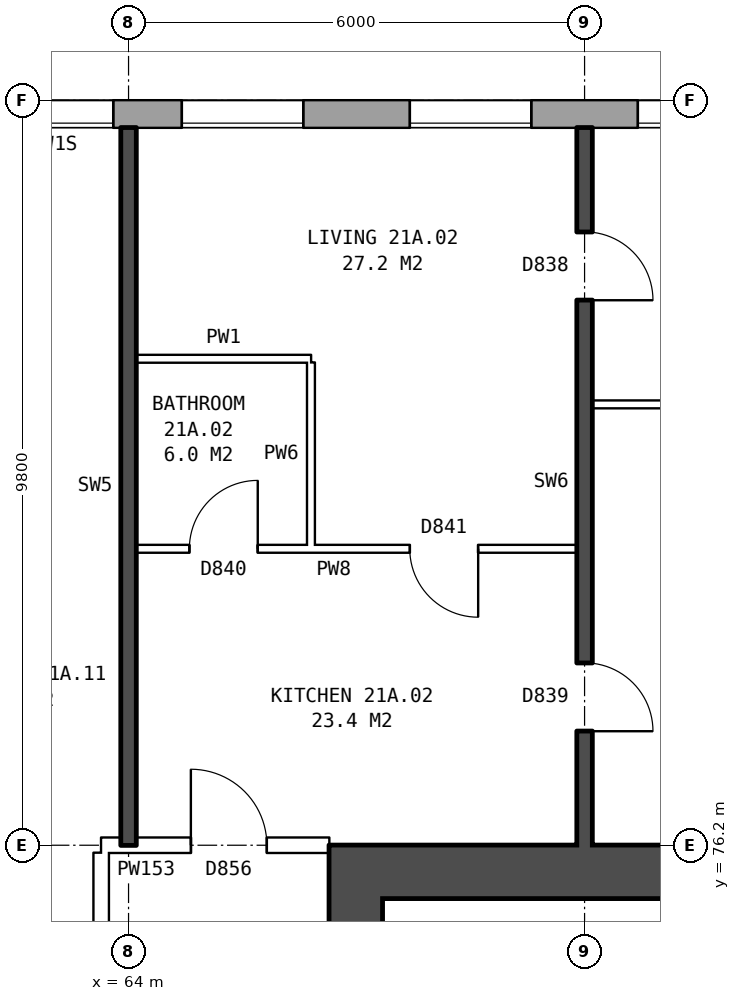
"""IFC4 building model, lengths in metres.
Left out: names, types, materials, properties, quantities, classifications, styles, units other than length and angle.
Written with IfcOpenShell. Run it as: python <this file> out.ifc"""

import sys

from ifc_helpers import new_model, si_unit, direction, frame, frame_2d, origin, place, context, subcontext, project, spatial, rectangle, extrude, element, fill, save


model = new_model("IFC4")
c1 = context("Model", 3, precision=1e-05, world=origin(), true_north=direction((0.0, 1.0)))
c2 = subcontext(c1, "Body", "Model", "MODEL_VIEW")
j1 = project(units=[si_unit("LENGTHUNIT", "METRE"), si_unit("PLANEANGLEUNIT", "RADIAN")], contexts=[c1])
p1 = place(None, origin())
s1 = spatial("IfcSite", under=j1, at=p1, CompositionType="ELEMENT")
p2 = place(p1, origin())
s2 = spatial("IfcBuilding", under=s1, at=p2, CompositionType="ELEMENT")
p3 = place(p2, frame((0.0, 0.0, 77.8)))
s3 = spatial("IfcBuildingStorey", under=s2, at=p3, CompositionType="ELEMENT", Elevation=77.8)
p4 = place(p3, frame((72.925, 85.82, 0.0), z_axis=(0.0, 0.0, 1.0), x_axis=(-1.0, 0.0, 0.0)))
e1 = element("IfcWall", 1, at=p4, inside=s3, PredefinedType="STANDARD", context=c2, shape_type="SweptSolid", body=[
    extrude(rectangle(XDim=46.601, YDim=0.36, at=frame_2d((23.3, 0.0))), origin(), (0.0, 0.0, 1.0), 2.85),
])
p5 = place(p4, frame((0.625, 0.0, 0.8)))
e2 = element("IfcOpeningElement", 2, at=p5, cuts=e1, PredefinedType="OPENING", context=c2, shape_type="SweptSolid", body=[
    extrude(rectangle(XDim=1.6, YDim=1.8, at=frame_2d((0.8, 0.9))), frame((0.0, 0.19, 0.0), z_axis=(0.0, -1.0, 0.0), x_axis=(1.0, 0.0, 0.0)), (0.0, 0.0, 1.0), 0.38),
])
p6 = place(p4, frame((3.625, 0.0, 0.8)))
e3 = element("IfcOpeningElement", 3, at=p6, cuts=e1, PredefinedType="OPENING", context=c2, shape_type="SweptSolid", body=[
    extrude(rectangle(XDim=1.6, YDim=1.8, at=frame_2d((0.8, 0.9))), frame((0.0, 0.19, 0.0), z_axis=(0.0, -1.0, 0.0), x_axis=(1.0, 0.0, 0.0)), (0.0, 0.0, 1.0), 0.38),
])
p7 = place(p4, frame((6.625, 0.0, 0.8)))
e4 = element("IfcOpeningElement", 4, at=p7, cuts=e1, PredefinedType="OPENING", context=c2, shape_type="SweptSolid", body=[
    extrude(rectangle(XDim=1.6, YDim=1.8, at=frame_2d((0.8, 0.9))), frame((0.0, 0.19, 0.0), z_axis=(0.0, -1.0, 0.0), x_axis=(1.0, 0.0, 0.0)), (0.0, 0.0, 1.0), 0.38),
])
p8 = place(p4, frame((9.125, 0.0, 1.65)))
e5 = element("IfcOpeningElement", 5, at=p8, cuts=e1, PredefinedType="OPENING", context=c2, shape_type="SweptSolid", body=[
    extrude(rectangle(XDim=1.4, YDim=0.9, at=frame_2d((0.7, 0.45))), frame((0.0, 0.19, 0.0), z_axis=(0.0, -1.0, 0.0), x_axis=(1.0, 0.0, 0.0)), (0.0, 0.0, 1.0), 0.38),
])
p9 = place(p4, frame((12.625, 0.0, 0.8)))
e6 = element("IfcOpeningElement", 6, at=p9, cuts=e1, PredefinedType="OPENING", context=c2, shape_type="SweptSolid", body=[
    extrude(rectangle(XDim=1.6, YDim=1.8, at=frame_2d((0.8, 0.9))), frame((0.0, 0.19, 0.0), z_axis=(0.0, -1.0, 0.0), x_axis=(1.0, 0.0, 0.0)), (0.0, 0.0, 1.0), 0.38),
])
p10 = place(p4, frame((15.625, 0.0, 0.8)))
e7 = element("IfcOpeningElement", 7, at=p10, cuts=e1, PredefinedType="OPENING", context=c2, shape_type="SweptSolid", body=[
    extrude(rectangle(XDim=1.6, YDim=1.8, at=frame_2d((0.8, 0.9))), frame((0.0, 0.19, 0.0), z_axis=(0.0, -1.0, 0.0), x_axis=(1.0, 0.0, 0.0)), (0.0, 0.0, 1.0), 0.38),
])
p11 = place(p4, frame((18.625, 0.0, 0.8)))
e8 = element("IfcOpeningElement", 8, at=p11, cuts=e1, PredefinedType="OPENING", context=c2, shape_type="SweptSolid", body=[
    extrude(rectangle(XDim=1.6, YDim=1.8, at=frame_2d((0.8, 0.9))), frame((0.0, 0.19, 0.0), z_axis=(0.0, -1.0, 0.0), x_axis=(1.0, 0.0, 0.0)), (0.0, 0.0, 1.0), 0.38),
])
p12 = place(p4, frame((21.625, 0.0, 0.8)))
e9 = element("IfcOpeningElement", 9, at=p12, cuts=e1, PredefinedType="OPENING", context=c2, shape_type="SweptSolid", body=[
    extrude(rectangle(XDim=1.6, YDim=1.8, at=frame_2d((0.8, 0.9))), frame((0.0, 0.19, 0.0), z_axis=(0.0, -1.0, 0.0), x_axis=(1.0, 0.0, 0.0)), (0.0, 0.0, 1.0), 0.38),
])
p13 = place(p4, frame((24.625, 0.0, 0.8)))
e10 = element("IfcOpeningElement", 10, at=p13, cuts=e1, PredefinedType="OPENING", context=c2, shape_type="SweptSolid", body=[
    extrude(rectangle(XDim=1.6, YDim=1.8, at=frame_2d((0.8, 0.9))), frame((0.0, 0.19, 0.0), z_axis=(0.0, -1.0, 0.0), x_axis=(1.0, 0.0, 0.0)), (0.0, 0.0, 1.0), 0.38),
])
p14 = place(p4, frame((27.625, 0.0, 0.8)))
e11 = element("IfcOpeningElement", 11, at=p14, cuts=e1, PredefinedType="OPENING", context=c2, shape_type="SweptSolid", body=[
    extrude(rectangle(XDim=1.6, YDim=1.8, at=frame_2d((0.8, 0.9))), frame((0.0, 0.19, 0.0), z_axis=(0.0, -1.0, 0.0), x_axis=(1.0, 0.0, 0.0)), (0.0, 0.0, 1.0), 0.38),
])
p15 = place(p4, frame((30.625, 0.0, 0.8)))
e12 = element("IfcOpeningElement", 12, at=p15, cuts=e1, PredefinedType="OPENING", context=c2, shape_type="SweptSolid", body=[
    extrude(rectangle(XDim=1.6, YDim=1.8, at=frame_2d((0.8, 0.9))), frame((0.0, 0.19, 0.0), z_axis=(0.0, -1.0, 0.0), x_axis=(1.0, 0.0, 0.0)), (0.0, 0.0, 1.0), 0.38),
])
p16 = place(p4, frame((33.125, 0.0, 0.75)))
e13 = element("IfcOpeningElement", 13, at=p16, cuts=e1, PredefinedType="OPENING", context=c2, shape_type="SweptSolid", body=[
    extrude(rectangle(XDim=0.6, YDim=1.8, at=frame_2d((0.3, 0.9))), frame((0.0, 0.19, 0.0), z_axis=(0.0, -1.0, 0.0), x_axis=(1.0, 0.0, 0.0)), (0.0, 0.0, 1.0), 0.38),
])
p17 = place(p4, frame((36.125, 0.0, 1.6)))
e14 = element("IfcOpeningElement", 14, at=p17, cuts=e1, PredefinedType="OPENING", context=c2, shape_type="SweptSolid", body=[
    extrude(rectangle(XDim=0.6, YDim=0.9, at=frame_2d((0.3, 0.45))), frame((0.0, 0.19, 0.0), z_axis=(0.0, -1.0, 0.0), x_axis=(1.0, 0.0, 0.0)), (0.0, 0.0, 1.0), 0.38),
])
p18 = place(p4, frame((39.625, 0.0, 0.8)))
e15 = element("IfcOpeningElement", 15, at=p18, cuts=e1, PredefinedType="OPENING", context=c2, shape_type="SweptSolid", body=[
    extrude(rectangle(XDim=1.6, YDim=1.8, at=frame_2d((0.8, 0.9))), frame((0.0, 0.19, 0.0), z_axis=(0.0, -1.0, 0.0), x_axis=(1.0, 0.0, 0.0)), (0.0, 0.0, 1.0), 0.38),
])
p19 = place(p4, frame((42.625, 0.0, 0.8)))
e16 = element("IfcOpeningElement", 16, at=p19, cuts=e1, PredefinedType="OPENING", context=c2, shape_type="SweptSolid", body=[
    extrude(rectangle(XDim=1.6, YDim=1.8, at=frame_2d((0.8, 0.9))), frame((0.0, 0.19, 0.0), z_axis=(0.0, -1.0, 0.0), x_axis=(1.0, 0.0, 0.0)), (0.0, 0.0, 1.0), 0.38),
])
p20 = place(p4, frame((11.125, 0.0, 0.15)))
e17 = element("IfcOpeningElement", 17, at=p20, cuts=e1, PredefinedType="OPENING", context=c2, shape_type="SweptSolid", body=[
    extrude(rectangle(XDim=0.6, YDim=0.9, at=frame_2d((0.3, 0.45))), frame((0.0, 0.19, 0.0), z_axis=(0.0, -1.0, 0.0), x_axis=(1.0, 0.0, 0.0)), (0.0, 0.0, 1.0), 0.38),
])
p21 = place(p4, frame((34.025, 0.0, 0.65)))
e18 = element("IfcOpeningElement", 18, at=p21, cuts=e1, PredefinedType="OPENING", context=c2, shape_type="SweptSolid", body=[
    extrude(rectangle(XDim=0.8, YDim=0.9, at=frame_2d((0.4, 0.45))), frame((0.0, 0.19, 0.0), z_axis=(0.0, -1.0, 0.0), x_axis=(1.0, 0.0, 0.0)), (0.0, 0.0, 1.0), 0.38),
])
p22 = place(p4, frame((37.025, 0.0, 0.8)))
e19 = element("IfcOpeningElement", 19, at=p22, cuts=e1, PredefinedType="OPENING", context=c2, shape_type="SweptSolid", body=[
    extrude(rectangle(XDim=1.6, YDim=1.8, at=frame_2d((0.8, 0.9))), frame((0.0, 0.19, 0.0), z_axis=(0.0, -1.0, 0.0), x_axis=(1.0, 0.0, 0.0)), (0.0, 0.0, 1.0), 0.38),
])
p23 = place(p3, frame((66.99, 64.5, 0.0), z_axis=(0.0, 0.0, 1.0), x_axis=(0.0, 1.0, 0.0)))
e20 = element("IfcWall", 20, at=p23, inside=s3, PredefinedType="SHEAR", context=c2, shape_type="SweptSolid", body=[
    extrude(rectangle(XDim=11.0, YDim=0.7, at=frame_2d((5.5, 0.0))), origin(), (0.0, 0.0, 1.0), 2.85),
])
p24 = place(p23, frame((0.625, 0.0, 0.0)))
e21 = element("IfcOpeningElement", 21, at=p24, cuts=e20, PredefinedType="OPENING", context=c2, shape_type="SweptSolid", body=[
    extrude(rectangle(XDim=1.1, YDim=2.1, at=frame_2d((0.55, 1.05))), frame((0.0, 0.36, 0.0), z_axis=(0.0, -1.0, 0.0), x_axis=(1.0, 0.0, 0.0)), (0.0, 0.0, 1.0), 0.72),
])
p25 = place(p23, frame((9.2, 0.0, 0.0)))
e22 = element("IfcOpeningElement", 22, at=p25, cuts=e20, PredefinedType="OPENING", context=c2, shape_type="SweptSolid", body=[
    extrude(rectangle(XDim=1.1, YDim=2.1, at=frame_2d((0.55, 1.05))), frame((0.0, 0.36, 0.0), z_axis=(0.0, -1.0, 0.0), x_axis=(1.0, 0.0, 0.0)), (0.0, 0.0, 1.0), 0.72),
])
p26 = place(p3, frame((66.64, 75.85, 0.0), z_axis=(0.0, 0.0, 1.0), x_axis=(1.0, 0.0, 0.0)))
e23 = element("IfcWall", 23, at=p26, inside=s3, PredefinedType="SHEAR", context=c2, shape_type="SweptSolid", body=[
    extrude(rectangle(XDim=9.0, YDim=0.7, at=frame_2d((4.5, 0.0))), origin(), (0.0, 0.0, 1.0), 2.85),
])
p27 = place(p3, frame((63.64, 63.9, 0.0), z_axis=(0.0, 0.0, 1.0), x_axis=(0.0, 1.0, 0.0)))
e24 = element("IfcWall", 24, at=p27, inside=s3, PredefinedType="PARTITIONING", context=c2, shape_type="SweptSolid", body=[
    extrude(rectangle(XDim=12.2, YDim=0.2, at=frame_2d((6.1, 0.0))), origin(), (0.0, 0.0, 1.0), 2.85),
])
p28 = place(p27, frame((5.1, 0.0, 0.0)))
e25 = element("IfcOpeningElement", 25, at=p28, cuts=e24, PredefinedType="OPENING", context=c2, shape_type="SweptSolid", body=[
    extrude(rectangle(XDim=2.0, YDim=2.1, at=frame_2d((1.0, 1.05))), frame((0.0, 0.11, 0.0), z_axis=(0.0, -1.0, 0.0), x_axis=(1.0, 0.0, 0.0)), (0.0, 0.0, 1.0), 0.22),
])
p29 = place(p3, frame((63.64, 76.2, 0.0), z_axis=(0.0, 0.0, 1.0), x_axis=(1.0, 0.0, 0.0)))
e26 = element("IfcWall", 26, at=p29, inside=s3, PredefinedType="PARTITIONING", context=c2, shape_type="SweptSolid", body=[
    extrude(rectangle(XDim=3.0, YDim=0.2, at=frame_2d((1.5, 0.0))), origin(), (0.0, 0.0, 1.0), 2.85),
])
p30 = place(p29, frame((1.18, 0.0, 0.0)))
e27 = element("IfcOpeningElement", 27, at=p30, cuts=e26, PredefinedType="OPENING", context=c2, shape_type="SweptSolid", body=[
    extrude(rectangle(XDim=1.0, YDim=2.1, at=frame_2d((0.5, 1.05))), frame((0.0, 0.11, 0.0), z_axis=(0.0, -1.0, 0.0), x_axis=(1.0, 0.0, 0.0)), (0.0, 0.0, 1.0), 0.22),
])
p31 = place(p3, frame((64.1, 80.1, 0.0), z_axis=(0.0, 0.0, 1.0), x_axis=(1.0, 0.0, 0.0)))
e28 = element("IfcWall", 28, at=p31, inside=s3, PredefinedType="PARTITIONING", context=c2, shape_type="SweptSolid", body=[
    extrude(rectangle(XDim=5.8, YDim=0.1, at=frame_2d((2.9, 0.0))), origin(), (0.0, 0.0, 1.0), 2.85),
])
p32 = place(p31, frame((3.6, 0.0, 0.0)))
e29 = element("IfcOpeningElement", 29, at=p32, cuts=e28, PredefinedType="OPENING", context=c2, shape_type="SweptSolid", body=[
    extrude(rectangle(XDim=0.9, YDim=2.1, at=frame_2d((0.45, 1.05))), frame((0.0, 0.06, 0.0), z_axis=(0.0, -1.0, 0.0), x_axis=(1.0, 0.0, 0.0)), (0.0, 0.0, 1.0), 0.12),
])
p33 = place(p31, frame((0.7, 0.0, 0.0)))
e30 = element("IfcOpeningElement", 30, at=p33, cuts=e28, PredefinedType="OPENING", context=c2, shape_type="SweptSolid", body=[
    extrude(rectangle(XDim=0.9, YDim=2.1, at=frame_2d((0.45, 1.05))), frame((0.0, 0.06, 0.0), z_axis=(0.0, -1.0, 0.0), x_axis=(1.0, 0.0, 0.0)), (0.0, 0.0, 1.0), 0.12),
])
p34 = place(p3, frame((70.1, 82.0, 0.0), z_axis=(0.0, 0.0, 1.0), x_axis=(1.0, 0.0, 0.0)))
e31 = element("IfcWall", 31, at=p34, inside=s3, PredefinedType="PARTITIONING", context=c2, shape_type="SweptSolid", body=[
    extrude(rectangle(XDim=5.54, YDim=0.1, at=frame_2d((2.77, 0.0))), origin(), (0.0, 0.0, 1.0), 2.85),
])
p35 = place(p3, frame((64.1, 82.6, 0.0), z_axis=(0.0, 0.0, 1.0), x_axis=(1.0, 0.0, 0.0)))
e32 = element("IfcWall", 32, at=p35, inside=s3, PredefinedType="PARTITIONING", context=c2, shape_type="SweptSolid", body=[
    extrude(rectangle(XDim=2.3, YDim=0.1, at=frame_2d((1.15, 0.0))), origin(), (0.0, 0.0, 1.0), 2.85),
])
p36 = place(p3, frame((64.0, 76.2, 0.0), z_axis=(0.0, 0.0, 1.0), x_axis=(0.0, 1.0, 0.0)))
e33 = element("IfcWall", 33, at=p36, inside=s3, PredefinedType="SOLIDWALL", context=c2, shape_type="SweptSolid", body=[
    extrude(rectangle(XDim=9.44, YDim=0.2, at=frame_2d((4.72, 0.0))), origin(), (0.0, 0.0, 1.0), 2.85),
])
p37 = place(p3, frame((66.4, 80.15, 0.0), z_axis=(0.0, 0.0, 1.0), x_axis=(0.0, 1.0, 0.0)))
e34 = element("IfcWall", 34, at=p37, inside=s3, PredefinedType="PARTITIONING", context=c2, shape_type="SweptSolid", body=[
    extrude(rectangle(XDim=2.4, YDim=0.1, at=frame_2d((1.2, 0.0))), origin(), (0.0, 0.0, 1.0), 2.85),
])
p38 = place(p3, frame((70.0, 76.2, 0.0), z_axis=(0.0, 0.0, 1.0), x_axis=(0.0, 1.0, 0.0)))
e35 = element("IfcWall", 35, at=p38, inside=s3, PredefinedType="SOLIDWALL", context=c2, shape_type="SweptSolid", body=[
    extrude(rectangle(XDim=9.44, YDim=0.2, at=frame_2d((4.72, 0.0))), origin(), (0.0, 0.0, 1.0), 2.85),
])
p39 = place(p38, frame((7.17, 0.0, 0.0)))
e36 = element("IfcOpeningElement", 36, at=p39, cuts=e35, PredefinedType="OPENING", context=c2, shape_type="SweptSolid", body=[
    extrude(rectangle(XDim=0.9, YDim=2.1, at=frame_2d((0.45, 1.05))), frame((0.0, 0.11, 0.0), z_axis=(0.0, -1.0, 0.0), x_axis=(1.0, 0.0, 0.0)), (0.0, 0.0, 1.0), 0.22),
])
p40 = place(p38, frame((1.5, 0.0, 0.0)))
e37 = element("IfcOpeningElement", 37, at=p40, cuts=e35, PredefinedType="OPENING", context=c2, shape_type="SweptSolid", body=[
    extrude(rectangle(XDim=0.9, YDim=2.1, at=frame_2d((0.45, 1.05))), frame((0.0, 0.11, 0.0), z_axis=(0.0, -1.0, 0.0), x_axis=(1.0, 0.0, 0.0)), (0.0, 0.0, 1.0), 0.22),
])
p41 = place(p5, origin())
e38 = element("IfcWindow", 38, at=p41, inside=s3, PartitioningType="SINGLE_PANEL", PredefinedType="WINDOW", context=c2, shape_type="SweptSolid", body=[
    extrude(rectangle(XDim=1.6, YDim=1.8, at=frame_2d((0.8, 0.9))), frame((0.0, 0.15, 0.0), z_axis=(0.0, -1.0, 0.0), x_axis=(1.0, 0.0, 0.0)), (0.0, 0.0, 1.0), 0.06),
])
fill(e2, e38)
p42 = place(p6, origin())
e39 = element("IfcWindow", 39, at=p42, inside=s3, PartitioningType="SINGLE_PANEL", PredefinedType="WINDOW", context=c2, shape_type="SweptSolid", body=[
    extrude(rectangle(XDim=1.6, YDim=1.8, at=frame_2d((0.8, 0.9))), frame((0.0, 0.15, 0.0), z_axis=(0.0, -1.0, 0.0), x_axis=(1.0, 0.0, 0.0)), (0.0, 0.0, 1.0), 0.06),
])
fill(e3, e39)
p43 = place(p7, origin())
e40 = element("IfcWindow", 40, at=p43, inside=s3, PartitioningType="SINGLE_PANEL", PredefinedType="WINDOW", context=c2, shape_type="SweptSolid", body=[
    extrude(rectangle(XDim=1.6, YDim=1.8, at=frame_2d((0.8, 0.9))), frame((0.0, 0.15, 0.0), z_axis=(0.0, -1.0, 0.0), x_axis=(1.0, 0.0, 0.0)), (0.0, 0.0, 1.0), 0.06),
])
fill(e4, e40)
p44 = place(p8, origin())
e41 = element("IfcWindow", 41, at=p44, inside=s3, PartitioningType="SINGLE_PANEL", PredefinedType="WINDOW", context=c2, shape_type="SweptSolid", body=[
    extrude(rectangle(XDim=1.4, YDim=0.9, at=frame_2d((0.7, 0.45))), frame((0.0, 0.15, 0.0), z_axis=(0.0, -1.0, 0.0), x_axis=(1.0, 0.0, 0.0)), (0.0, 0.0, 1.0), 0.06),
])
fill(e5, e41)
p45 = place(p39, frame((0.9, 0.0, 0.0), z_axis=(0.0, 0.0, 1.0), x_axis=(-1.0, 0.0, 0.0)))
e42 = element("IfcDoor", 42, at=p45, inside=s3, OperationType="SINGLE_SWING_RIGHT", PredefinedType="DOOR", context=c2, shape_type="SweptSolid", body=[
    extrude(rectangle(XDim=0.9, YDim=2.1, at=frame_2d((0.45, 1.05))), frame((0.0, 0.025, 0.0), z_axis=(0.0, -1.0, 0.0), x_axis=(1.0, 0.0, 0.0)), (0.0, 0.0, 1.0), 0.05),
])
fill(e36, e42)
p46 = place(p40, frame((0.9, 0.0, 0.0), z_axis=(0.0, 0.0, 1.0), x_axis=(-1.0, 0.0, 0.0)))
e43 = element("IfcDoor", 43, at=p46, inside=s3, OperationType="SINGLE_SWING_RIGHT", PredefinedType="DOOR", context=c2, shape_type="SweptSolid", body=[
    extrude(rectangle(XDim=0.9, YDim=2.1, at=frame_2d((0.45, 1.05))), frame((0.0, 0.025, 0.0), z_axis=(0.0, -1.0, 0.0), x_axis=(1.0, 0.0, 0.0)), (0.0, 0.0, 1.0), 0.05),
])
fill(e37, e43)
p47 = place(p30, origin())
e44 = element("IfcDoor", 44, at=p47, inside=s3, OperationType="SINGLE_SWING_LEFT", PredefinedType="DOOR", context=c2, shape_type="SweptSolid", body=[
    extrude(rectangle(XDim=1.0, YDim=2.1, at=frame_2d((0.5, 1.05))), frame((0.0, 0.025, 0.0), z_axis=(0.0, -1.0, 0.0), x_axis=(1.0, 0.0, 0.0)), (0.0, 0.0, 1.0), 0.05),
])
fill(e27, e44)
p48 = place(p32, frame((0.9, 0.0, 0.0), z_axis=(0.0, 0.0, 1.0), x_axis=(-1.0, 0.0, 0.0)))
e45 = element("IfcDoor", 45, at=p48, inside=s3, OperationType="SINGLE_SWING_LEFT", PredefinedType="DOOR", context=c2, shape_type="SweptSolid", body=[
    extrude(rectangle(XDim=0.9, YDim=2.1, at=frame_2d((0.45, 1.05))), frame((0.0, 0.025, 0.0), z_axis=(0.0, -1.0, 0.0), x_axis=(1.0, 0.0, 0.0)), (0.0, 0.0, 1.0), 0.05),
])
fill(e29, e45)
p49 = place(p33, origin())
e46 = element("IfcDoor", 46, at=p49, inside=s3, OperationType="SINGLE_SWING_RIGHT", PredefinedType="DOOR", context=c2, shape_type="SweptSolid", body=[
    extrude(rectangle(XDim=0.9, YDim=2.1, at=frame_2d((0.45, 1.05))), frame((0.0, 0.025, 0.0), z_axis=(0.0, -1.0, 0.0), x_axis=(1.0, 0.0, 0.0)), (0.0, 0.0, 1.0), 0.05),
])
fill(e30, e46)
save(model, sys.argv[1])
